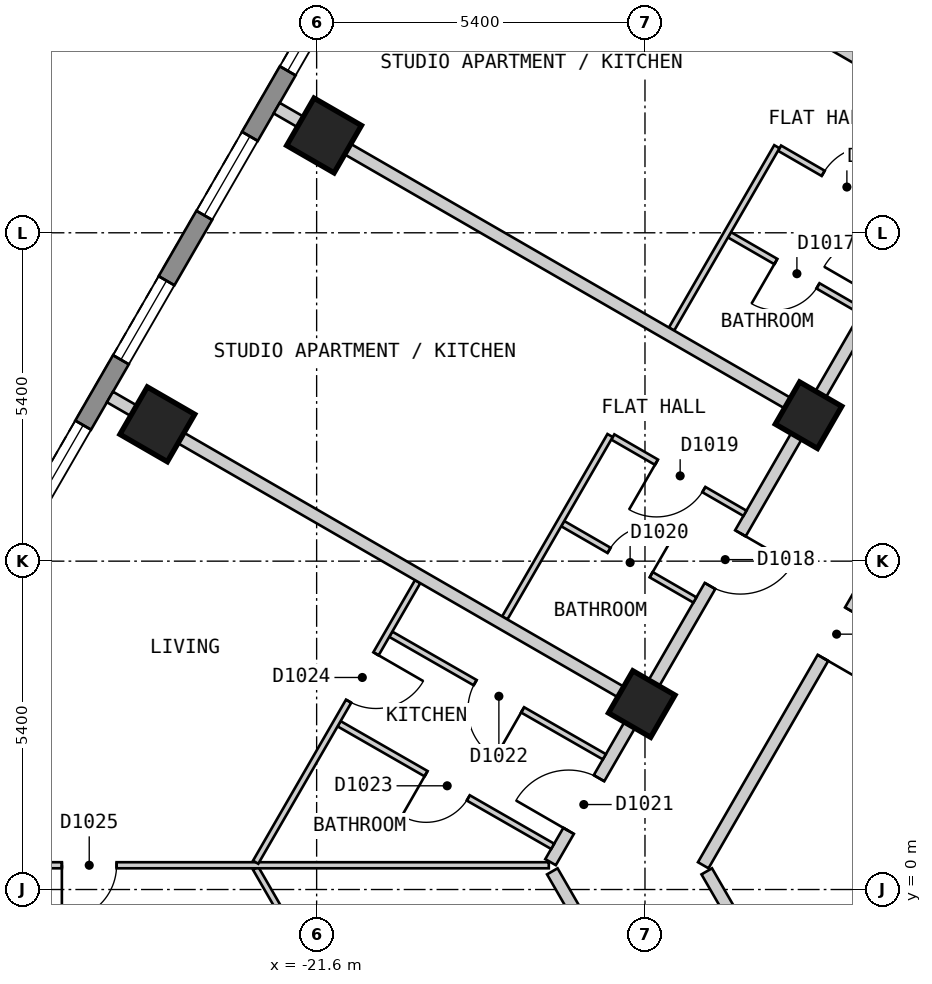
"""IFC4 building model, lengths in metres.
Left out: names, types, materials, properties, quantities, classifications, styles, units other than length and angle.
Written with IfcOpenShell. Run it as: python <this file> out.ifc"""

import sys

from ifc_helpers import new_model, si_unit, direction, frame, frame_2d, origin, origin_2d, place, context, subcontext, project, spatial, polyline, rectangle, outline, extrude, element, fill, save


model = new_model("IFC4")
c1 = context("Model", 3, precision=1e-05, world=origin(), true_north=direction((0.0, 1.0)))
c2 = subcontext(c1, "Body", "Model", "MODEL_VIEW")
j1 = project(units=[si_unit("LENGTHUNIT", "METRE"), si_unit("PLANEANGLEUNIT", "RADIAN")], contexts=[c1])
p1 = place(None, origin())
s1 = spatial("IfcSite", under=j1, at=p1, CompositionType="ELEMENT")
p2 = place(p1, origin())
s2 = spatial("IfcBuilding", under=s1, at=p2, CompositionType="ELEMENT")
p3 = place(p2, frame((0.0, 0.0, 120.6)))
s3 = spatial("IfcBuildingStorey", under=s2, at=p3, CompositionType="ELEMENT", Elevation=120.6)
for number, where, z_axis, x_axis in (
    (1, (-21.478, 12.4, 0.0), (0.0, 0.0, 1.0), (-0.5, -0.866, 0.0)),
    (2, (-24.22, 7.65, 0.0), (0.0, 0.0, 1.0), (-0.5, -0.866, 0.0)),
):
    element("IfcColumn", number, at=place(p3, frame(where, z_axis=z_axis, x_axis=x_axis)), inside=s3, PredefinedType="COLUMN", context=c2, shape_type="SweptSolid", body=[
        extrude(rectangle(XDim=0.9, YDim=0.9, at=origin_2d()), origin(), (0.0, 0.0, 1.0), 3.0),
    ])
for number, where, z_axis, x_axis in (
    (3, (-13.51, 7.8, 0.0), (0.0, 0.0, 1.0), (-0.5, -0.866, 0.0)),
    (4, (-16.253, 3.05, 0.0), (0.0, 0.0, 1.0), (-0.5, -0.866, 0.0)),
):
    element("IfcColumn", number, at=place(p3, frame(where, z_axis=z_axis, x_axis=x_axis)), inside=s3, PredefinedType="COLUMN", context=c2, shape_type="SweptSolid", body=[
        extrude(rectangle(XDim=0.8, YDim=0.8, at=origin_2d()), origin(), (0.0, 0.0, 1.0), 3.0),
    ])
p4 = place(p3, frame((-16.555, 23.025, 0.0), z_axis=(0.0, 0.0, 1.0), x_axis=(-0.500020536353, -0.866013546791, 0.0)))
e5 = element("IfcWall", 5, at=p4, inside=s3, PredefinedType="SOLIDWALL", context=c2, shape_type="SweptSolid", body=[
    extrude(outline(polyline([(0.0, -0.15), (23.325, -0.15), (23.245, 0.15), (0.08, 0.15), (0.0, -0.15)])), origin(), (0.0, 0.0, 1.0), 2.7),
])
p5 = place(p4, frame((1.314, 0.0, 0.15)))
e6 = element("IfcOpeningElement", 6, at=p5, cuts=e5, PredefinedType="OPENING", context=c2, shape_type="SweptSolid", body=[
    extrude(rectangle(XDim=1.5, YDim=2.1, at=frame_2d((0.75, 1.05))), frame((0.0, 0.16, 0.0), z_axis=(0.0, -1.0, 0.0), x_axis=(1.0, 0.0, 0.0)), (0.0, 0.0, 1.0), 0.32),
])
p6 = place(p4, frame((4.056, 0.0, 0.15)))
e7 = element("IfcOpeningElement", 7, at=p6, cuts=e5, PredefinedType="OPENING", context=c2, shape_type="SweptSolid", body=[
    extrude(rectangle(XDim=1.5, YDim=2.1, at=frame_2d((0.75, 1.05))), frame((0.0, 0.16, 0.0), z_axis=(0.0, -1.0, 0.0), x_axis=(1.0, 0.0, 0.0)), (0.0, 0.0, 1.0), 0.32),
])
p7 = place(p4, frame((6.799, 0.0, 0.15)))
e8 = element("IfcOpeningElement", 8, at=p7, cuts=e5, PredefinedType="OPENING", context=c2, shape_type="SweptSolid", body=[
    extrude(rectangle(XDim=1.5, YDim=2.1, at=frame_2d((0.75, 1.05))), frame((0.0, 0.16, 0.0), z_axis=(0.0, -1.0, 0.0), x_axis=(1.0, 0.0, 0.0)), (0.0, 0.0, 1.0), 0.32),
])
p8 = place(p4, frame((9.541, 0.0, 0.15)))
e9 = element("IfcOpeningElement", 9, at=p8, cuts=e5, PredefinedType="OPENING", context=c2, shape_type="SweptSolid", body=[
    extrude(rectangle(XDim=1.5, YDim=2.1, at=frame_2d((0.75, 1.05))), frame((0.0, 0.16, 0.0), z_axis=(0.0, -1.0, 0.0), x_axis=(1.0, 0.0, 0.0)), (0.0, 0.0, 1.0), 0.32),
])
p9 = place(p4, frame((12.285, 0.0, 0.15)))
e10 = element("IfcOpeningElement", 10, at=p9, cuts=e5, PredefinedType="OPENING", context=c2, shape_type="SweptSolid", body=[
    extrude(rectangle(XDim=1.5, YDim=2.1, at=frame_2d((0.75, 1.05))), frame((0.0, 0.16, 0.0), z_axis=(0.0, -1.0, 0.0), x_axis=(1.0, 0.0, 0.0)), (0.0, 0.0, 1.0), 0.32),
])
p10 = place(p4, frame((15.027, 0.0, 0.15)))
e11 = element("IfcOpeningElement", 11, at=p10, cuts=e5, PredefinedType="OPENING", context=c2, shape_type="SweptSolid", body=[
    extrude(rectangle(XDim=1.5, YDim=2.1, at=frame_2d((0.75, 1.05))), frame((0.0, 0.16, 0.0), z_axis=(0.0, -1.0, 0.0), x_axis=(1.0, 0.0, 0.0)), (0.0, 0.0, 1.0), 0.32),
])
p11 = place(p4, frame((17.769, 0.0, 0.15)))
e12 = element("IfcOpeningElement", 12, at=p11, cuts=e5, PredefinedType="OPENING", context=c2, shape_type="SweptSolid", body=[
    extrude(rectangle(XDim=1.5, YDim=2.1, at=frame_2d((0.75, 1.05))), frame((0.0, 0.16, 0.0), z_axis=(0.0, -1.0, 0.0), x_axis=(1.0, 0.0, 0.0)), (0.0, 0.0, 1.0), 0.32),
])
p12 = place(p4, frame((20.512, 0.0, 0.15)))
e13 = element("IfcOpeningElement", 13, at=p12, cuts=e5, PredefinedType="OPENING", context=c2, shape_type="SweptSolid", body=[
    extrude(rectangle(XDim=1.5, YDim=2.1, at=frame_2d((0.75, 1.05))), frame((0.0, 0.16, 0.0), z_axis=(0.0, -1.0, 0.0), x_axis=(1.0, 0.0, 0.0)), (0.0, 0.0, 1.0), 0.32),
])
p13 = place(p3, frame((-15.184, 0.299, 0.0), z_axis=(0.0, 0.0, 1.0), x_axis=(0.500149577091, -0.865939028186, 0.0)))
e14 = element("IfcWall", 14, at=p13, inside=s3, PredefinedType="PARTITIONING", context=c2, shape_type="SweptSolid", body=[
    extrude(rectangle(XDim=3.463, YDim=0.2, at=frame_2d((1.732, 0.0))), origin(), (0.0, 0.0, 1.0), 2.7),
])
p14 = place(p3, frame((-17.724, 0.299, 0.0), z_axis=(0.0, 0.0, 1.0), x_axis=(0.499910220442, -0.866077231832, 0.0)))
e15 = element("IfcWall", 15, at=p14, inside=s3, PredefinedType="PARTITIONING", context=c2, shape_type="SweptSolid", body=[
    extrude(rectangle(XDim=3.189, YDim=0.2, at=frame_2d((1.594, 0.0))), origin(), (0.0, 0.0, 1.0), 2.7),
])
p15 = place(p3, frame((-15.242, 0.399, 0.0), z_axis=(0.0, 0.0, 1.0), x_axis=(0.499953615651, 0.866052182145, 0.0)))
e16 = element("IfcWall", 16, at=p15, inside=s3, PredefinedType="PARTITIONING", context=c2, shape_type="SweptSolid", body=[
    extrude(rectangle(XDim=8.777, YDim=0.2, at=frame_2d((4.388, 0.0))), origin(), (0.0, 0.0, 1.0), 2.7),
])
p16 = place(p15, frame((3.938, 0.0, 0.0)))
e17 = element("IfcOpeningElement", 17, at=p16, cuts=e16, PredefinedType="OPENING", context=c2, shape_type="SweptSolid", body=[
    extrude(rectangle(XDim=0.9, YDim=2.1, at=frame_2d((0.45, 1.05))), frame((0.0, 0.11, 0.0), z_axis=(0.0, -1.0, 0.0), x_axis=(1.0, 0.0, 0.0)), (0.0, 0.0, 1.0), 0.22),
])
p17 = place(p3, frame((-17.753, 0.45, 0.0), z_axis=(0.0, 0.0, 1.0), x_axis=(0.499990970252, 0.866030617049, 0.0)))
e18 = element("IfcWall", 18, at=p17, inside=s3, PredefinedType="PARTITIONING", context=c2, shape_type="SweptSolid", body=[
    extrude(rectangle(XDim=16.974, YDim=0.2, at=frame_2d((8.487, 0.0))), origin(), (0.0, 0.0, 1.0), 2.7),
])
p18 = place(p17, frame((10.73, 0.0, 0.0)))
e19 = element("IfcOpeningElement", 19, at=p18, cuts=e18, PredefinedType="OPENING", context=c2, shape_type="SweptSolid", body=[
    extrude(rectangle(XDim=1.0, YDim=2.1, at=frame_2d((0.5, 1.05))), frame((0.0, 0.11, 0.0), z_axis=(0.0, -1.0, 0.0), x_axis=(1.0, 0.0, 0.0)), (0.0, 0.0, 1.0), 0.22),
])
p19 = place(p17, frame((5.245, 0.0, 0.0)))
e20 = element("IfcOpeningElement", 20, at=p19, cuts=e18, PredefinedType="OPENING", context=c2, shape_type="SweptSolid", body=[
    extrude(rectangle(XDim=1.0, YDim=2.1, at=frame_2d((0.5, 1.05))), frame((0.0, 0.11, 0.0), z_axis=(0.0, -1.0, 0.0), x_axis=(1.0, 0.0, 0.0)), (0.0, 0.0, 1.0), 0.22),
])
p20 = place(p17, frame((0.594, 0.0, 0.0)))
e21 = element("IfcOpeningElement", 21, at=p20, cuts=e18, PredefinedType="OPENING", context=c2, shape_type="SweptSolid", body=[
    extrude(rectangle(XDim=1.0, YDim=2.1, at=frame_2d((0.5, 1.05))), frame((0.0, 0.11, 0.0), z_axis=(0.0, -1.0, 0.0), x_axis=(1.0, 0.0, 0.0)), (0.0, 0.0, 1.0), 0.22),
])
p21 = place(p3, frame((-22.603, 0.349, 0.0), z_axis=(0.0, 0.0, 1.0), x_axis=(0.499930403552, -0.866065581584, 0.0)))
e22 = element("IfcWall", 22, at=p21, inside=s3, PredefinedType="PARTITIONING", context=c2, shape_type="SweptSolid", body=[
    extrude(rectangle(XDim=3.117, YDim=0.1, at=frame_2d((1.558, 0.0))), origin(), (0.0, 0.0, 1.0), 2.7),
])
p22 = place(p3, frame((-17.553, 6.017, 0.0), z_axis=(0.0, 0.0, 1.0), x_axis=(0.866038211682, -0.499977815414, 0.0)))
e23 = element("IfcWall", 23, at=p22, inside=s3, PredefinedType="PARTITIONING", context=c2, shape_type="SweptSolid", body=[
    extrude(rectangle(XDim=2.51, YDim=0.1, at=frame_2d((1.255, 0.0))), origin(), (0.0, 0.0, 1.0), 2.7),
])
p23 = place(p22, frame((0.88, 0.0, 0.0)))
e24 = element("IfcOpeningElement", 24, at=p23, cuts=e23, PredefinedType="OPENING", context=c2, shape_type="SweptSolid", body=[
    extrude(rectangle(XDim=0.8, YDim=2.1, at=frame_2d((0.4, 1.05))), frame((0.0, 0.06, 0.0), z_axis=(0.0, -1.0, 0.0), x_axis=(1.0, 0.0, 0.0)), (0.0, 0.0, 1.0), 0.12),
])
p24 = place(p3, frame((-20.381, 4.198, 0.0), z_axis=(0.0, 0.0, 1.0), x_axis=(0.867459321792, -0.497508115549, 0.0)))
e25 = element("IfcWall", 25, at=p24, inside=s3, PredefinedType="PARTITIONING", context=c2, shape_type="SweptSolid", body=[
    extrude(rectangle(XDim=4.05, YDim=0.1, at=frame_2d((2.025, 0.0))), origin(), (0.0, 0.0, 1.0), 2.7),
])
p25 = place(p24, frame((1.6, 0.0, 0.0)))
e26 = element("IfcOpeningElement", 26, at=p25, cuts=e25, PredefinedType="OPENING", context=c2, shape_type="SweptSolid", body=[
    extrude(rectangle(XDim=0.9, YDim=2.1, at=frame_2d((0.45, 1.05))), frame((0.0, 0.06, 0.0), z_axis=(0.0, -1.0, 0.0), x_axis=(1.0, 0.0, 0.0)), (0.0, 0.0, 1.0), 0.12),
])
p26 = place(p3, frame((-21.231, 2.726, 0.0), z_axis=(0.0, 0.0, 1.0), x_axis=(0.867314299312, -0.497760892607, 0.0)))
e27 = element("IfcWall", 27, at=p26, inside=s3, PredefinedType="PARTITIONING", context=c2, shape_type="SweptSolid", body=[
    extrude(rectangle(XDim=4.05, YDim=0.1, at=frame_2d((2.025, 0.0))), origin(), (0.0, 0.0, 1.0), 2.7),
])
p27 = place(p26, frame((1.65, 0.0, 0.0)))
e28 = element("IfcOpeningElement", 28, at=p27, cuts=e27, PredefinedType="OPENING", context=c2, shape_type="SweptSolid", body=[
    extrude(rectangle(XDim=0.8, YDim=2.1, at=frame_2d((0.4, 1.05))), frame((0.0, 0.06, 0.0), z_axis=(0.0, -1.0, 0.0), x_axis=(1.0, 0.0, 0.0)), (0.0, 0.0, 1.0), 0.12),
])
p28 = place(p3, frame((-16.729, 7.442, 0.0), z_axis=(0.0, 0.0, 1.0), x_axis=(0.865983051302, -0.500073349477, 0.0)))
e29 = element("IfcWall", 29, at=p28, inside=s3, PredefinedType="PARTITIONING", context=c2, shape_type="SweptSolid", body=[
    extrude(rectangle(XDim=2.509, YDim=0.1, at=frame_2d((1.255, 0.0))), origin(), (0.0, 0.0, 1.0), 2.7),
])
p29 = place(p28, frame((0.829, 0.0, 0.0)))
e30 = element("IfcOpeningElement", 30, at=p29, cuts=e29, PredefinedType="OPENING", context=c2, shape_type="SweptSolid", body=[
    extrude(rectangle(XDim=0.9, YDim=2.1, at=frame_2d((0.45, 1.05))), frame((0.0, 0.06, 0.0), z_axis=(0.0, -1.0, 0.0), x_axis=(1.0, 0.0, 0.0)), (0.0, 0.0, 1.0), 0.12),
])
p30 = place(p3, frame((-13.987, 12.192, 0.0), z_axis=(0.0, 0.0, 1.0), x_axis=(0.865983051302, -0.500073349477, 0.0)))
e31 = element("IfcWall", 31, at=p30, inside=s3, PredefinedType="PARTITIONING", context=c2, shape_type="SweptSolid", body=[
    extrude(rectangle(XDim=2.509, YDim=0.1, at=frame_2d((1.255, 0.0))), origin(), (0.0, 0.0, 1.0), 2.7),
])
p31 = place(p30, frame((0.829, 0.0, 0.0)))
e32 = element("IfcOpeningElement", 32, at=p31, cuts=e31, PredefinedType="OPENING", context=c2, shape_type="SweptSolid", body=[
    extrude(rectangle(XDim=0.9, YDim=2.1, at=frame_2d((0.45, 1.05))), frame((0.0, 0.06, 0.0), z_axis=(0.0, -1.0, 0.0), x_axis=(1.0, 0.0, 0.0)), (0.0, 0.0, 1.0), 0.12),
])
p32 = place(p3, frame((-14.81, 10.767, 0.0), z_axis=(0.0, 0.0, 1.0), x_axis=(0.866038211682, -0.499977815414, 0.0)))
e33 = element("IfcWall", 33, at=p32, inside=s3, PredefinedType="PARTITIONING", context=c2, shape_type="SweptSolid", body=[
    extrude(rectangle(XDim=2.51, YDim=0.1, at=frame_2d((1.255, 0.0))), origin(), (0.0, 0.0, 1.0), 2.7),
])
p33 = place(p32, frame((0.88, 0.0, 0.0)))
e34 = element("IfcOpeningElement", 34, at=p33, cuts=e33, PredefinedType="OPENING", context=c2, shape_type="SweptSolid", body=[
    extrude(rectangle(XDim=0.8, YDim=2.1, at=frame_2d((0.4, 1.05))), frame((0.0, 0.06, 0.0), z_axis=(0.0, -1.0, 0.0), x_axis=(1.0, 0.0, 0.0)), (0.0, 0.0, 1.0), 0.12),
])
p34 = place(p3, frame((-28.048, 0.399, 0.0), z_axis=(0.0, 0.0, 1.0), x_axis=(1.0, 0.0, 0.0)))
e35 = element("IfcWall", 35, at=p34, inside=s3, PredefinedType="PARTITIONING", context=c2, shape_type="SweptSolid", body=[
    extrude(rectangle(XDim=10.266, YDim=0.1, at=frame_2d((5.133, 0.0))), origin(), (0.0, 0.0, 1.0), 2.7),
])
p35 = place(p34, frame((2.258, 0.0, 0.0)))
e36 = element("IfcOpeningElement", 36, at=p35, cuts=e35, PredefinedType="OPENING", context=c2, shape_type="SweptSolid", body=[
    extrude(rectangle(XDim=0.9, YDim=2.1, at=frame_2d((0.45, 1.05))), frame((0.0, 0.06, 0.0), z_axis=(0.0, -1.0, 0.0), x_axis=(1.0, 0.0, 0.0)), (0.0, 0.0, 1.0), 0.12),
])
p36 = place(p3, frame((-18.506, 4.466, 0.0), z_axis=(0.0, 0.0, 1.0), x_axis=(0.500027479704, 0.866009537788, 0.0)))
e37 = element("IfcWall", 37, at=p36, inside=s3, PredefinedType="PARTITIONING", context=c2, shape_type="SweptSolid", body=[
    extrude(rectangle(XDim=3.464, YDim=0.1, at=frame_2d((1.732, 0.0))), origin(), (0.0, 0.0, 1.0), 2.7),
])
p37 = place(p3, frame((-15.763, 9.217, 0.0), z_axis=(0.0, 0.0, 1.0), x_axis=(0.500096714907, 0.865969558206, 0.0)))
e38 = element("IfcWall", 38, at=p37, inside=s3, PredefinedType="PARTITIONING", context=c2, shape_type="SweptSolid", body=[
    extrude(rectangle(XDim=3.463, YDim=0.1, at=frame_2d((1.731, 0.0))), origin(), (0.0, 0.0, 1.0), 2.7),
])
p38 = place(p3, frame((-22.603, 0.449, 0.0), z_axis=(0.0, 0.0, 1.0), x_axis=(0.500022588228, 0.866012362072, 0.0)))
e39 = element("IfcWall", 39, at=p38, inside=s3, PredefinedType="PARTITIONING", context=c2, shape_type="SweptSolid", body=[
    extrude(rectangle(XDim=5.328, YDim=0.1, at=frame_2d((2.664, 0.0))), origin(), (0.0, 0.0, 1.0), 2.7),
])
p39 = place(p38, frame((3.058, 0.0, 0.0)))
e40 = element("IfcOpeningElement", 40, at=p39, cuts=e39, PredefinedType="OPENING", context=c2, shape_type="SweptSolid", body=[
    extrude(rectangle(XDim=0.9, YDim=2.1, at=frame_2d((0.45, 1.05))), frame((0.0, 0.06, 0.0), z_axis=(0.0, -1.0, 0.0), x_axis=(1.0, 0.0, 0.0)), (0.0, 0.0, 1.0), 0.12),
])
p40 = place(p3, frame((-24.999, 8.1, 0.0), z_axis=(0.0, 0.0, 1.0), x_axis=(0.866016855193, -0.500014806302, 0.0)))
e41 = element("IfcWall", 41, at=p40, inside=s3, PredefinedType="PARTITIONING", context=c2, shape_type="SweptSolid", body=[
    extrude(rectangle(XDim=10.0, YDim=0.2, at=frame_2d((5.0, 0.0))), origin(), (0.0, 0.0, 1.0), 2.7),
])
p41 = place(p3, frame((-22.257, 12.85, 0.0), z_axis=(0.0, 0.0, 1.0), x_axis=(0.866047370643, -0.499961950354, 0.0)))
e42 = element("IfcWall", 42, at=p41, inside=s3, PredefinedType="PARTITIONING", context=c2, shape_type="SweptSolid", body=[
    extrude(rectangle(XDim=10.001, YDim=0.2, at=frame_2d((5.0, 0.0))), origin(), (0.0, 0.0, 1.0), 2.7),
])
p42 = place(p3, frame((-19.514, 17.599, 0.0), z_axis=(0.0, 0.0, 1.0), x_axis=(0.866059142644, -0.499941558027, 0.0)))
e43 = element("IfcWall", 43, at=p42, inside=s3, PredefinedType="PARTITIONING", context=c2, shape_type="SweptSolid", body=[
    extrude(rectangle(XDim=9.999, YDim=0.2, at=frame_2d((5.0, 0.0))), origin(), (0.0, 0.0, 1.0), 2.7),
])
p43 = place(p8, origin())
e44 = element("IfcWindow", 44, at=p43, inside=s3, PartitioningType="SINGLE_PANEL", PredefinedType="WINDOW", context=c2, shape_type="SweptSolid", body=[
    extrude(rectangle(XDim=1.5, YDim=2.1, at=frame_2d((0.75, 1.05))), frame((0.0, 0.03, 0.0), z_axis=(0.0, -1.0, 0.0), x_axis=(1.0, 0.0, 0.0)), (0.0, 0.0, 1.0), 0.06),
])
fill(e9, e44)
p44 = place(p9, origin())
e45 = element("IfcWindow", 45, at=p44, inside=s3, PartitioningType="SINGLE_PANEL", PredefinedType="WINDOW", context=c2, shape_type="SweptSolid", body=[
    extrude(rectangle(XDim=1.5, YDim=2.1, at=frame_2d((0.75, 1.05))), frame((0.0, 0.03, 0.0), z_axis=(0.0, -1.0, 0.0), x_axis=(1.0, 0.0, 0.0)), (0.0, 0.0, 1.0), 0.06),
])
fill(e10, e45)
p45 = place(p10, origin())
e46 = element("IfcWindow", 46, at=p45, inside=s3, PartitioningType="SINGLE_PANEL", PredefinedType="WINDOW", context=c2, shape_type="SweptSolid", body=[
    extrude(rectangle(XDim=1.5, YDim=2.1, at=frame_2d((0.75, 1.05))), frame((0.0, 0.03, 0.0), z_axis=(0.0, -1.0, 0.0), x_axis=(1.0, 0.0, 0.0)), (0.0, 0.0, 1.0), 0.06),
])
fill(e11, e46)
p46 = place(p11, origin())
e47 = element("IfcWindow", 47, at=p46, inside=s3, PartitioningType="SINGLE_PANEL", PredefinedType="WINDOW", context=c2, shape_type="SweptSolid", body=[
    extrude(rectangle(XDim=1.5, YDim=2.1, at=frame_2d((0.75, 1.05))), frame((0.0, 0.03, 0.0), z_axis=(0.0, -1.0, 0.0), x_axis=(1.0, 0.0, 0.0)), (0.0, 0.0, 1.0), 0.06),
])
fill(e12, e47)
p47 = place(p31, origin())
e48 = element("IfcDoor", 48, at=p47, inside=s3, OperationType="SINGLE_SWING_RIGHT", PredefinedType="DOOR", context=c2, shape_type="SweptSolid", body=[
    extrude(rectangle(XDim=0.9, YDim=2.1, at=frame_2d((0.45, 1.05))), frame((0.0, 0.025, 0.0), z_axis=(0.0, -1.0, 0.0), x_axis=(1.0, 0.0, 0.0)), (0.0, 0.0, 1.0), 0.05),
])
fill(e32, e48)
p48 = place(p33, origin())
e49 = element("IfcDoor", 49, at=p48, inside=s3, OperationType="SINGLE_SWING_LEFT", PredefinedType="DOOR", context=c2, shape_type="SweptSolid", body=[
    extrude(rectangle(XDim=0.8, YDim=2.1, at=frame_2d((0.4, 1.05))), frame((0.0, 0.025, 0.0), z_axis=(0.0, -1.0, 0.0), x_axis=(1.0, 0.0, 0.0)), (0.0, 0.0, 1.0), 0.05),
])
fill(e34, e49)
p49 = place(p19, origin())
e50 = element("IfcDoor", 50, at=p49, inside=s3, OperationType="SINGLE_SWING_RIGHT", PredefinedType="DOOR", context=c2, shape_type="SweptSolid", body=[
    extrude(rectangle(XDim=1.0, YDim=2.1, at=frame_2d((0.5, 1.05))), frame((0.0, 0.025, 0.0), z_axis=(0.0, -1.0, 0.0), x_axis=(1.0, 0.0, 0.0)), (0.0, 0.0, 1.0), 0.05),
])
fill(e20, e50)
p50 = place(p29, origin())
e51 = element("IfcDoor", 51, at=p50, inside=s3, OperationType="SINGLE_SWING_LEFT", PredefinedType="DOOR", context=c2, shape_type="SweptSolid", body=[
    extrude(rectangle(XDim=0.9, YDim=2.1, at=frame_2d((0.45, 1.05))), frame((0.0, 0.025, 0.0), z_axis=(0.0, -1.0, 0.0), x_axis=(1.0, 0.0, 0.0)), (0.0, 0.0, 1.0), 0.05),
])
fill(e30, e51)
p51 = place(p23, origin())
e52 = element("IfcDoor", 52, at=p51, inside=s3, OperationType="SINGLE_SWING_RIGHT", PredefinedType="DOOR", context=c2, shape_type="SweptSolid", body=[
    extrude(rectangle(XDim=0.8, YDim=2.1, at=frame_2d((0.4, 1.05))), frame((0.0, 0.025, 0.0), z_axis=(0.0, -1.0, 0.0), x_axis=(1.0, 0.0, 0.0)), (0.0, 0.0, 1.0), 0.05),
])
fill(e24, e52)
p52 = place(p20, origin())
e53 = element("IfcDoor", 53, at=p52, inside=s3, OperationType="SINGLE_SWING_LEFT", PredefinedType="DOOR", context=c2, shape_type="SweptSolid", body=[
    extrude(rectangle(XDim=1.0, YDim=2.1, at=frame_2d((0.5, 1.05))), frame((0.0, 0.025, 0.0), z_axis=(0.0, -1.0, 0.0), x_axis=(1.0, 0.0, 0.0)), (0.0, 0.0, 1.0), 0.05),
])
fill(e21, e53)
p53 = place(p25, origin())
e54 = element("IfcDoor", 54, at=p53, inside=s3, OperationType="SINGLE_SWING_RIGHT", PredefinedType="DOOR", context=c2, shape_type="SweptSolid", body=[
    extrude(rectangle(XDim=0.9, YDim=2.1, at=frame_2d((0.45, 1.05))), frame((0.0, 0.025, 0.0), z_axis=(0.0, -1.0, 0.0), x_axis=(1.0, 0.0, 0.0)), (0.0, 0.0, 1.0), 0.05),
])
fill(e26, e54)
p54 = place(p27, origin())
e55 = element("IfcDoor", 55, at=p54, inside=s3, OperationType="SINGLE_SWING_LEFT", PredefinedType="DOOR", context=c2, shape_type="SweptSolid", body=[
    extrude(rectangle(XDim=0.8, YDim=2.1, at=frame_2d((0.4, 1.05))), frame((0.0, 0.025, 0.0), z_axis=(0.0, -1.0, 0.0), x_axis=(1.0, 0.0, 0.0)), (0.0, 0.0, 1.0), 0.05),
])
fill(e28, e55)
p55 = place(p39, origin())
e56 = element("IfcDoor", 56, at=p55, inside=s3, OperationType="SINGLE_SWING_RIGHT", PredefinedType="DOOR", context=c2, shape_type="SweptSolid", body=[
    extrude(rectangle(XDim=0.9, YDim=2.1, at=frame_2d((0.45, 1.05))), frame((0.0, 0.025, 0.0), z_axis=(0.0, -1.0, 0.0), x_axis=(1.0, 0.0, 0.0)), (0.0, 0.0, 1.0), 0.05),
])
fill(e40, e56)
p56 = place(p35, origin())
e57 = element("IfcDoor", 57, at=p56, inside=s3, OperationType="SINGLE_SWING_LEFT", PredefinedType="DOOR", context=c2, shape_type="SweptSolid", body=[
    extrude(rectangle(XDim=0.9, YDim=2.1, at=frame_2d((0.45, 1.05))), frame((0.0, 0.025, 0.0), z_axis=(0.0, -1.0, 0.0), x_axis=(1.0, 0.0, 0.0)), (0.0, 0.0, 1.0), 0.05),
])
fill(e36, e57)
p57 = place(p16, origin())
e58 = element("IfcDoor", 58, at=p57, inside=s3, OperationType="SINGLE_SWING_LEFT", PredefinedType="DOOR", context=c2, shape_type="SweptSolid", body=[
    extrude(rectangle(XDim=0.9, YDim=2.1, at=frame_2d((0.45, 1.05))), frame((0.0, 0.025, 0.0), z_axis=(0.0, -1.0, 0.0), x_axis=(1.0, 0.0, 0.0)), (0.0, 0.0, 1.0), 0.05),
])
fill(e17, e58)
save(model, sys.argv[1])
